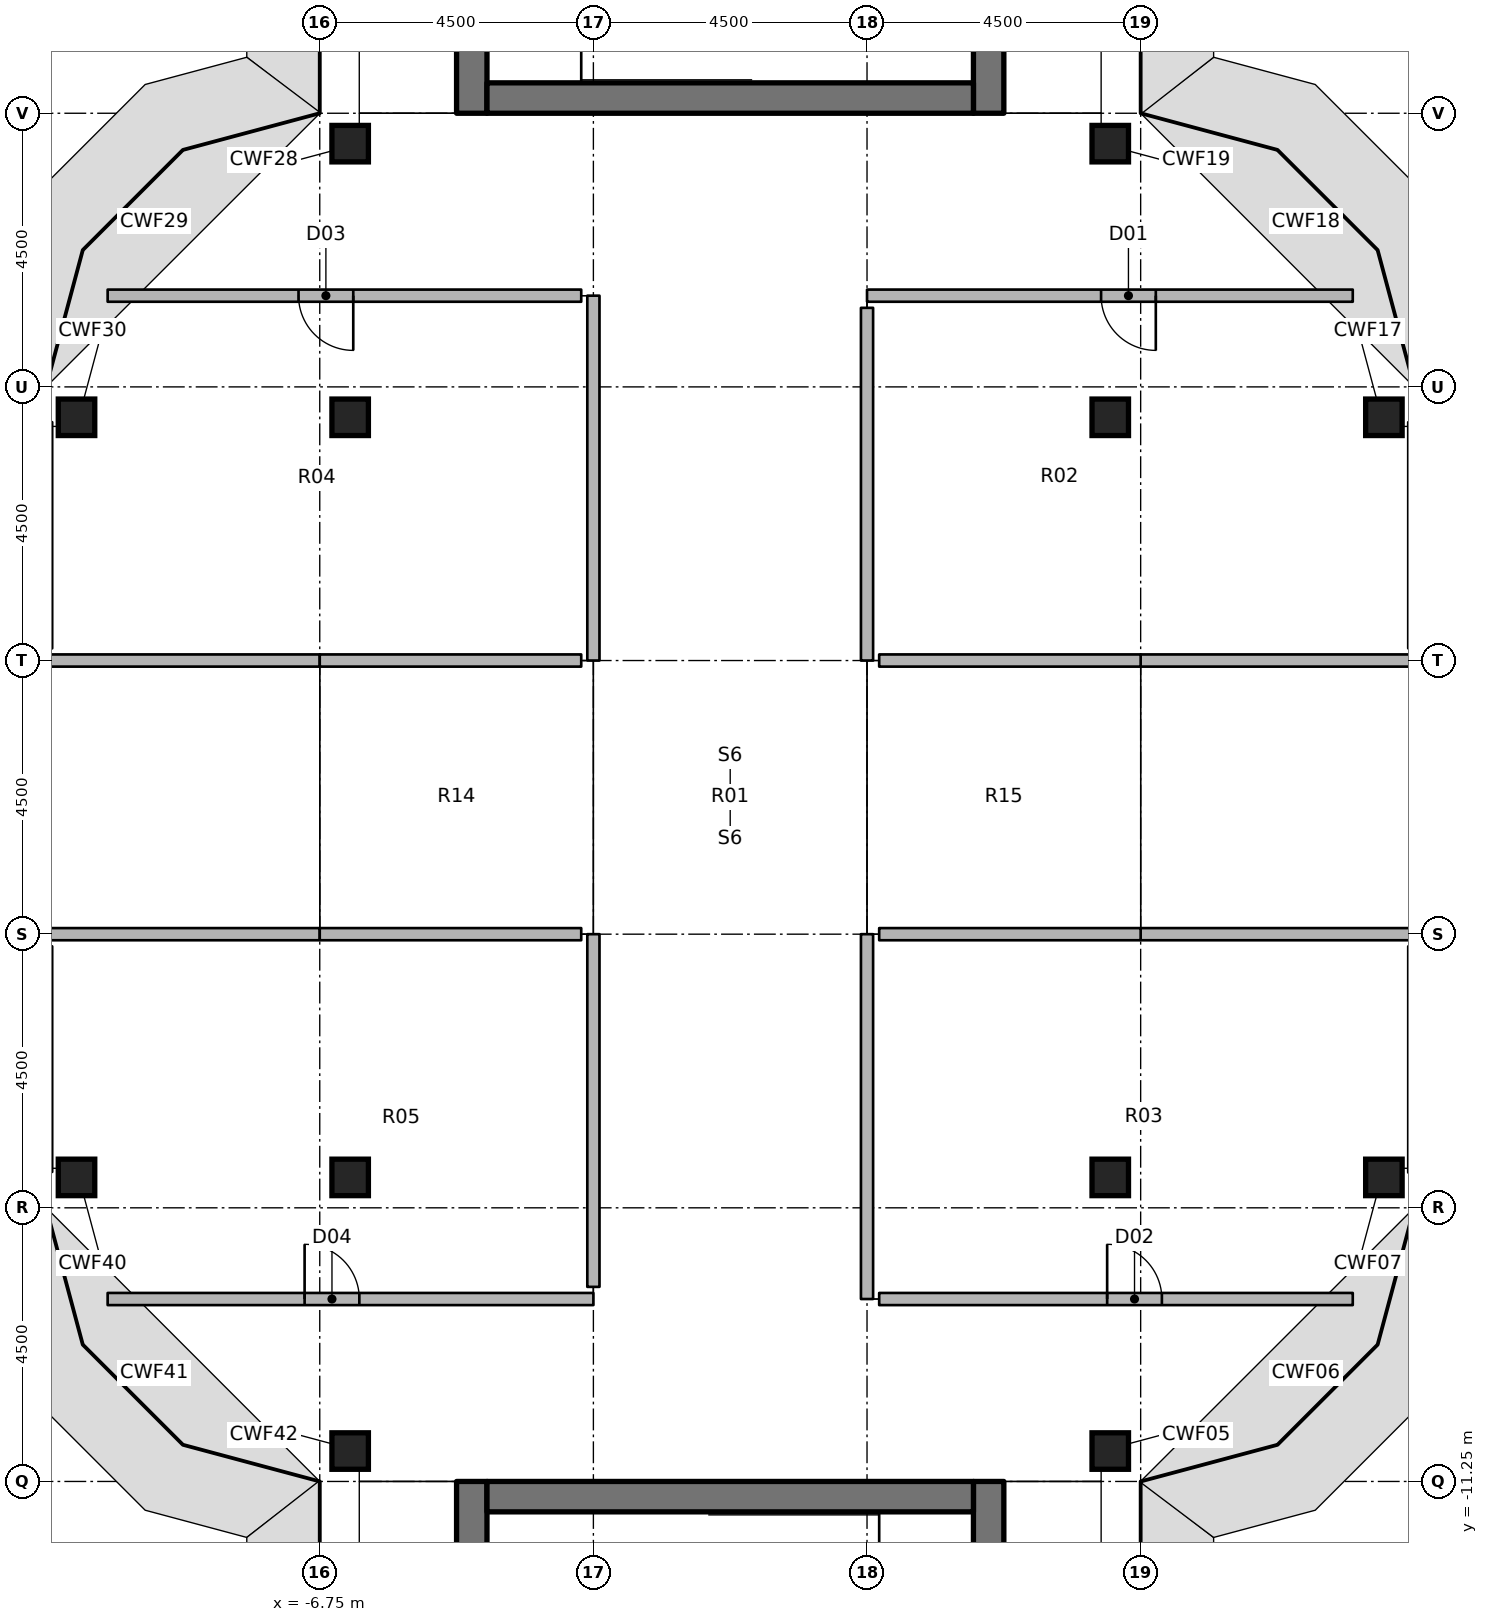
"""IFC4 building model, lengths in metres.
Left out: names, types, materials, properties, quantities, classifications, styles, units other than length and angle.
Written with IfcOpenShell. Run it as: python <this file> out.ifc"""

import sys

from ifc_helpers import new_model, si_unit, direction, frame, frame_2d, origin, origin_2d, place, context, subcontext, project, spatial, rectangle, extrude, element, fill, save


model = new_model("IFC4")
c1 = context("Model", 3, precision=1e-05, world=origin(), true_north=direction((0.0, 1.0)))
c2 = subcontext(c1, "Body", "Model", "MODEL_VIEW")
j1 = project(units=[si_unit("LENGTHUNIT", "METRE"), si_unit("PLANEANGLEUNIT", "RADIAN")], contexts=[c1])
p1 = place(None, origin())
s1 = spatial("IfcSite", under=j1, at=p1, CompositionType="ELEMENT")
p2 = place(p1, origin())
s2 = spatial("IfcBuilding", under=s1, at=p2, CompositionType="ELEMENT")
p3 = place(p2, frame((0.0, 0.0, 291.6)))
s3 = spatial("IfcBuildingStorey", under=s2, at=p3, CompositionType="ELEMENT", Elevation=291.6)
for number, where, z_axis, x_axis in (
    (1, (-10.75, -6.25, 0.0), (0.0, 0.0, 1.0), (1.0, 0.0, 0.0)),
    (2, (-10.75, 6.25, 0.0), (0.0, 0.0, 1.0), (1.0, 0.0, 0.0)),
    (3, (-6.25, -10.75, 0.0), (0.0, 0.0, 1.0), (1.0, 0.0, 0.0)),
    (4, (-6.25, -6.25, 0.0), (0.0, 0.0, 1.0), (1.0, 0.0, 0.0)),
    (5, (-6.25, 6.25, 0.0), (0.0, 0.0, 1.0), (1.0, 0.0, 0.0)),
    (6, (-6.25, 10.75, 0.0), (0.0, 0.0, 1.0), (1.0, 0.0, 0.0)),
    (7, (6.25, -10.75, 0.0), (0.0, 0.0, 1.0), (1.0, 0.0, 0.0)),
    (8, (6.25, -6.25, 0.0), (0.0, 0.0, 1.0), (1.0, 0.0, 0.0)),
    (9, (6.25, 6.25, 0.0), (0.0, 0.0, 1.0), (1.0, 0.0, 0.0)),
    (10, (6.25, 10.75, 0.0), (0.0, 0.0, 1.0), (1.0, 0.0, 0.0)),
    (11, (10.75, -6.25, 0.0), (0.0, 0.0, 1.0), (1.0, 0.0, 0.0)),
    (12, (10.75, 6.25, 0.0), (0.0, 0.0, 1.0), (1.0, 0.0, 0.0)),
):
    element("IfcColumn", number, at=place(p3, frame(where, z_axis=z_axis, x_axis=x_axis)), inside=s3, PredefinedType="COLUMN", context=c2, shape_type="SweptSolid", body=[
        extrude(rectangle(XDim=0.6, YDim=0.6, at=origin_2d()), origin(), (0.0, 0.0, 1.0), 3.45),
    ])
p4 = place(p3, frame((-4.25, 11.25, 0.0), z_axis=(0.0, 0.0, 1.0), x_axis=(0.0, 1.0, 0.0)))
e13 = element("IfcWall", 13, at=p4, inside=s3, PredefinedType="SHEAR", context=c2, shape_type="SweptSolid", body=[
    extrude(rectangle(XDim=15.0, YDim=0.5, at=frame_2d((7.5, 0.0))), origin(), (0.0, 0.0, 1.0), 3.6),
])
p5 = place(p4, frame((7.15, 0.0, 0.0)))
e14 = element("IfcOpeningElement", 14, at=p5, cuts=e13, PredefinedType="OPENING", context=c2, shape_type="SweptSolid", body=[
    extrude(rectangle(XDim=1.5, YDim=2.3, at=frame_2d((0.75, 1.15))), frame((0.0, 0.26, 0.0), z_axis=(0.0, -1.0, 0.0), x_axis=(1.0, 0.0, 0.0)), (0.0, 0.0, 1.0), 0.52),
])
p6 = place(p4, frame((13.9, 0.0, 0.0)))
e15 = element("IfcOpeningElement", 15, at=p6, cuts=e13, PredefinedType="OPENING", context=c2, shape_type="SweptSolid", body=[
    extrude(rectangle(XDim=0.9, YDim=2.1, at=frame_2d((0.45, 1.05))), frame((0.0, 0.26, 0.0), z_axis=(0.0, -1.0, 0.0), x_axis=(1.0, 0.0, 0.0)), (0.0, 0.0, 1.0), 0.52),
])
p7 = place(p4, frame((1.15, 0.0, 0.0)))
e16 = element("IfcOpeningElement", 16, at=p7, cuts=e13, PredefinedType="OPENING", context=c2, shape_type="SweptSolid", body=[
    extrude(rectangle(XDim=1.2, YDim=2.1, at=frame_2d((0.6, 1.05))), frame((0.0, 0.26, 0.0), z_axis=(0.0, -1.0, 0.0), x_axis=(1.0, 0.0, 0.0)), (0.0, 0.0, 1.0), 0.52),
])
p8 = place(p3, frame((4.25, 11.25, 0.0), z_axis=(0.0, 0.0, 1.0), x_axis=(0.0, 1.0, 0.0)))
e17 = element("IfcWall", 17, at=p8, inside=s3, PredefinedType="SHEAR", context=c2, shape_type="SweptSolid", body=[
    extrude(rectangle(XDim=15.0, YDim=0.5, at=frame_2d((7.5, 0.0))), origin(), (0.0, 0.0, 1.0), 3.6),
])
p9 = place(p8, frame((7.15, 0.0, 0.0)))
e18 = element("IfcOpeningElement", 18, at=p9, cuts=e17, PredefinedType="OPENING", context=c2, shape_type="SweptSolid", body=[
    extrude(rectangle(XDim=1.5, YDim=2.3, at=frame_2d((0.75, 1.15))), frame((0.0, 0.26, 0.0), z_axis=(0.0, -1.0, 0.0), x_axis=(1.0, 0.0, 0.0)), (0.0, 0.0, 1.0), 0.52),
])
p10 = place(p8, frame((5.55, 0.0, 0.0)))
e19 = element("IfcOpeningElement", 19, at=p10, cuts=e17, PredefinedType="OPENING", context=c2, shape_type="SweptSolid", body=[
    extrude(rectangle(XDim=1.2, YDim=2.1, at=frame_2d((0.6, 1.05))), frame((0.0, 0.26, 0.0), z_axis=(0.0, -1.0, 0.0), x_axis=(1.0, 0.0, 0.0)), (0.0, 0.0, 1.0), 0.52),
])
p11 = place(p3, frame((-4.0, 11.5, 0.0), z_axis=(0.0, 0.0, 1.0), x_axis=(1.0, 0.0, 0.0)))
e20 = element("IfcWall", 20, at=p11, inside=s3, PredefinedType="SHEAR", context=c2, shape_type="SweptSolid", body=[
    extrude(rectangle(XDim=8.0, YDim=0.5, at=frame_2d((4.0, 0.0))), origin(), (0.0, 0.0, 1.0), 3.6),
])
p12 = place(p3, frame((-4.25, -11.25, 0.0), z_axis=(0.0, 0.0, 1.0), x_axis=(0.0, -1.0, 0.0)))
e21 = element("IfcWall", 21, at=p12, inside=s3, PredefinedType="SHEAR", context=c2, shape_type="SweptSolid", body=[
    extrude(rectangle(XDim=15.0, YDim=0.5, at=frame_2d((7.5, 0.0))), origin(), (0.0, 0.0, 1.0), 3.6),
])
p13 = place(p12, frame((7.15, 0.0, 0.0)))
e22 = element("IfcOpeningElement", 22, at=p13, cuts=e21, PredefinedType="OPENING", context=c2, shape_type="SweptSolid", body=[
    extrude(rectangle(XDim=1.5, YDim=2.3, at=frame_2d((0.75, 1.15))), frame((0.0, 0.26, 0.0), z_axis=(0.0, -1.0, 0.0), x_axis=(1.0, 0.0, 0.0)), (0.0, 0.0, 1.0), 0.52),
])
p14 = place(p12, frame((5.55, 0.0, 0.0)))
e23 = element("IfcOpeningElement", 23, at=p14, cuts=e21, PredefinedType="OPENING", context=c2, shape_type="SweptSolid", body=[
    extrude(rectangle(XDim=1.2, YDim=2.1, at=frame_2d((0.6, 1.05))), frame((0.0, 0.26, 0.0), z_axis=(0.0, -1.0, 0.0), x_axis=(1.0, 0.0, 0.0)), (0.0, 0.0, 1.0), 0.52),
])
p15 = place(p3, frame((4.25, -11.25, 0.0), z_axis=(0.0, 0.0, 1.0), x_axis=(0.0, -1.0, 0.0)))
e24 = element("IfcWall", 24, at=p15, inside=s3, PredefinedType="SHEAR", context=c2, shape_type="SweptSolid", body=[
    extrude(rectangle(XDim=15.0, YDim=0.5, at=frame_2d((7.5, 0.0))), origin(), (0.0, 0.0, 1.0), 3.6),
])
p16 = place(p15, frame((7.15, 0.0, 0.0)))
e25 = element("IfcOpeningElement", 25, at=p16, cuts=e24, PredefinedType="OPENING", context=c2, shape_type="SweptSolid", body=[
    extrude(rectangle(XDim=1.5, YDim=2.3, at=frame_2d((0.75, 1.15))), frame((0.0, 0.26, 0.0), z_axis=(0.0, -1.0, 0.0), x_axis=(1.0, 0.0, 0.0)), (0.0, 0.0, 1.0), 0.52),
])
p17 = place(p15, frame((13.9, 0.0, 0.0)))
e26 = element("IfcOpeningElement", 26, at=p17, cuts=e24, PredefinedType="OPENING", context=c2, shape_type="SweptSolid", body=[
    extrude(rectangle(XDim=0.9, YDim=2.1, at=frame_2d((0.45, 1.05))), frame((0.0, 0.26, 0.0), z_axis=(0.0, -1.0, 0.0), x_axis=(1.0, 0.0, 0.0)), (0.0, 0.0, 1.0), 0.52),
])
p18 = place(p15, frame((1.15, 0.0, 0.0)))
e27 = element("IfcOpeningElement", 27, at=p18, cuts=e24, PredefinedType="OPENING", context=c2, shape_type="SweptSolid", body=[
    extrude(rectangle(XDim=1.2, YDim=2.1, at=frame_2d((0.6, 1.05))), frame((0.0, 0.26, 0.0), z_axis=(0.0, -1.0, 0.0), x_axis=(1.0, 0.0, 0.0)), (0.0, 0.0, 1.0), 0.52),
])
p19 = place(p3, frame((-4.0, -11.5, 0.0), z_axis=(0.0, 0.0, 1.0), x_axis=(1.0, 0.0, 0.0)))
e28 = element("IfcWall", 28, at=p19, inside=s3, PredefinedType="SHEAR", context=c2, shape_type="SweptSolid", body=[
    extrude(rectangle(XDim=8.0, YDim=0.5, at=frame_2d((4.0, 0.0))), origin(), (0.0, 0.0, 1.0), 3.6),
])
p20 = place(p3, frame((10.238, 8.25, 0.0), z_axis=(0.0, 0.0, 1.0), x_axis=(-1.0, 0.0, 0.0)))
e29 = element("IfcWall", 29, at=p20, inside=s3, PredefinedType="PARTITIONING", context=c2, shape_type="SweptSolid", body=[
    extrude(rectangle(XDim=7.988, YDim=0.2, at=frame_2d((3.994, 0.0))), origin(), (0.0, 0.0, 1.0), 3.45),
])
p21 = place(p20, frame((3.239, 0.0, 0.0)))
e30 = element("IfcOpeningElement", 30, at=p21, cuts=e29, PredefinedType="OPENING", context=c2, shape_type="SweptSolid", body=[
    extrude(rectangle(XDim=0.9, YDim=2.1, at=frame_2d((0.45, 1.05))), frame((0.0, 0.11, 0.0), z_axis=(0.0, -1.0, 0.0), x_axis=(1.0, 0.0, 0.0)), (0.0, 0.0, 1.0), 0.22),
])
p22 = place(p3, frame((2.25, 8.05, 0.0), z_axis=(0.0, 0.0, 1.0), x_axis=(0.0, -1.0, 0.0)))
e31 = element("IfcWall", 31, at=p22, inside=s3, PredefinedType="PARTITIONING", context=c2, shape_type="SweptSolid", body=[
    extrude(rectangle(XDim=5.8, YDim=0.2, at=frame_2d((2.9, 0.0))), origin(), (0.0, 0.0, 1.0), 2.681),
])
p23 = place(p3, frame((2.25, -2.25, 0.0), z_axis=(0.0, 0.0, 1.0), x_axis=(0.0, -1.0, 0.0)))
e32 = element("IfcWall", 32, at=p23, inside=s3, PredefinedType="PARTITIONING", context=c2, shape_type="SweptSolid", body=[
    extrude(rectangle(XDim=6.0, YDim=0.2, at=frame_2d((3.0, 0.0))), origin(), (0.0, 0.0, 1.0), 2.681),
])
p24 = place(p3, frame((2.45, -8.25, 0.0), z_axis=(0.0, 0.0, 1.0), x_axis=(1.0, 0.0, 0.0)))
e33 = element("IfcWall", 33, at=p24, inside=s3, PredefinedType="PARTITIONING", context=c2, shape_type="SweptSolid", body=[
    extrude(rectangle(XDim=7.788, YDim=0.2, at=frame_2d((3.894, 0.0))), origin(), (0.0, 0.0, 1.0), 3.45),
])
p25 = place(p24, frame((3.749, 0.0, 0.0)))
e34 = element("IfcOpeningElement", 34, at=p25, cuts=e33, PredefinedType="OPENING", context=c2, shape_type="SweptSolid", body=[
    extrude(rectangle(XDim=0.9, YDim=2.1, at=frame_2d((0.45, 1.05))), frame((0.0, 0.11, 0.0), z_axis=(0.0, -1.0, 0.0), x_axis=(1.0, 0.0, 0.0)), (0.0, 0.0, 1.0), 0.22),
])
p26 = place(p3, frame((-2.25, 2.25, 0.0), z_axis=(0.0, 0.0, 1.0), x_axis=(0.0, 1.0, 0.0)))
e35 = element("IfcWall", 35, at=p26, inside=s3, PredefinedType="PARTITIONING", context=c2, shape_type="SweptSolid", body=[
    extrude(rectangle(XDim=6.0, YDim=0.2, at=frame_2d((3.0, 0.0))), origin(), (0.0, 0.0, 1.0), 2.681),
])
p27 = place(p3, frame((-2.45, 8.25, 0.0), z_axis=(0.0, 0.0, 1.0), x_axis=(-1.0, 0.0, 0.0)))
e36 = element("IfcWall", 36, at=p27, inside=s3, PredefinedType="PARTITIONING", context=c2, shape_type="SweptSolid", body=[
    extrude(rectangle(XDim=7.788, YDim=0.2, at=frame_2d((3.894, 0.0))), origin(), (0.0, 0.0, 1.0), 3.45),
])
p28 = place(p27, frame((3.749, 0.0, 0.0)))
e37 = element("IfcOpeningElement", 37, at=p28, cuts=e36, PredefinedType="OPENING", context=c2, shape_type="SweptSolid", body=[
    extrude(rectangle(XDim=0.9, YDim=2.1, at=frame_2d((0.45, 1.05))), frame((0.0, 0.11, 0.0), z_axis=(0.0, -1.0, 0.0), x_axis=(1.0, 0.0, 0.0)), (0.0, 0.0, 1.0), 0.22),
])
p29 = place(p3, frame((-10.238, -8.25, 0.0), z_axis=(0.0, 0.0, 1.0), x_axis=(1.0, 0.0, 0.0)))
e38 = element("IfcWall", 38, at=p29, inside=s3, PredefinedType="PARTITIONING", context=c2, shape_type="SweptSolid", body=[
    extrude(rectangle(XDim=7.988, YDim=0.2, at=frame_2d((3.994, 0.0))), origin(), (0.0, 0.0, 1.0), 3.45),
])
p30 = place(p29, frame((3.239, 0.0, 0.0)))
e39 = element("IfcOpeningElement", 39, at=p30, cuts=e38, PredefinedType="OPENING", context=c2, shape_type="SweptSolid", body=[
    extrude(rectangle(XDim=0.9, YDim=2.1, at=frame_2d((0.45, 1.05))), frame((0.0, 0.11, 0.0), z_axis=(0.0, -1.0, 0.0), x_axis=(1.0, 0.0, 0.0)), (0.0, 0.0, 1.0), 0.22),
])
p31 = place(p3, frame((-2.25, -8.05, 0.0), z_axis=(0.0, 0.0, 1.0), x_axis=(0.0, 1.0, 0.0)))
e40 = element("IfcWall", 40, at=p31, inside=s3, PredefinedType="PARTITIONING", context=c2, shape_type="SweptSolid", body=[
    extrude(rectangle(XDim=5.8, YDim=0.2, at=frame_2d((2.9, 0.0))), origin(), (0.0, 0.0, 1.0), 2.681),
])
p32 = place(p3, frame((11.25, 2.25, 0.0), z_axis=(0.0, 0.0, 1.0), x_axis=(-1.0, 0.0, 0.0)))
e41 = element("IfcWall", 41, at=p32, inside=s3, PredefinedType="PARTITIONING", context=c2, shape_type="SweptSolid", body=[
    extrude(rectangle(XDim=4.5, YDim=0.2, at=frame_2d((2.25, 0.0))), origin(), (0.0, 0.0, 1.0), 2.828),
])
p33 = place(p3, frame((6.75, 2.25, 0.0), z_axis=(0.0, 0.0, 1.0), x_axis=(-1.0, 0.0, 0.0)))
e42 = element("IfcWall", 42, at=p33, inside=s3, PredefinedType="PARTITIONING", context=c2, shape_type="SweptSolid", body=[
    extrude(rectangle(XDim=4.3, YDim=0.2, at=frame_2d((2.15, 0.0))), origin(), (0.0, 0.0, 1.0), 2.828),
])
p34 = place(p3, frame((6.75, -2.25, 0.0), z_axis=(0.0, 0.0, 1.0), x_axis=(1.0, 0.0, 0.0)))
e43 = element("IfcWall", 43, at=p34, inside=s3, PredefinedType="PARTITIONING", context=c2, shape_type="SweptSolid", body=[
    extrude(rectangle(XDim=4.5, YDim=0.2, at=frame_2d((2.25, 0.0))), origin(), (0.0, 0.0, 1.0), 2.828),
])
p35 = place(p3, frame((2.45, -2.25, 0.0), z_axis=(0.0, 0.0, 1.0), x_axis=(1.0, 0.0, 0.0)))
e44 = element("IfcWall", 44, at=p35, inside=s3, PredefinedType="PARTITIONING", context=c2, shape_type="SweptSolid", body=[
    extrude(rectangle(XDim=4.3, YDim=0.2, at=frame_2d((2.15, 0.0))), origin(), (0.0, 0.0, 1.0), 2.828),
])
p36 = place(p3, frame((-6.75, 2.25, 0.0), z_axis=(0.0, 0.0, 1.0), x_axis=(-1.0, 0.0, 0.0)))
e45 = element("IfcWall", 45, at=p36, inside=s3, PredefinedType="PARTITIONING", context=c2, shape_type="SweptSolid", body=[
    extrude(rectangle(XDim=4.5, YDim=0.2, at=frame_2d((2.25, 0.0))), origin(), (0.0, 0.0, 1.0), 2.828),
])
p37 = place(p3, frame((-2.45, 2.25, 0.0), z_axis=(0.0, 0.0, 1.0), x_axis=(-1.0, 0.0, 0.0)))
e46 = element("IfcWall", 46, at=p37, inside=s3, PredefinedType="PARTITIONING", context=c2, shape_type="SweptSolid", body=[
    extrude(rectangle(XDim=4.3, YDim=0.2, at=frame_2d((2.15, 0.0))), origin(), (0.0, 0.0, 1.0), 2.828),
])
p38 = place(p3, frame((-11.25, -2.25, 0.0), z_axis=(0.0, 0.0, 1.0), x_axis=(1.0, 0.0, 0.0)))
e47 = element("IfcWall", 47, at=p38, inside=s3, PredefinedType="PARTITIONING", context=c2, shape_type="SweptSolid", body=[
    extrude(rectangle(XDim=4.5, YDim=0.2, at=frame_2d((2.25, 0.0))), origin(), (0.0, 0.0, 1.0), 2.828),
])
p39 = place(p3, frame((-6.75, -2.25, 0.0), z_axis=(0.0, 0.0, 1.0), x_axis=(1.0, 0.0, 0.0)))
e48 = element("IfcWall", 48, at=p39, inside=s3, PredefinedType="PARTITIONING", context=c2, shape_type="SweptSolid", body=[
    extrude(rectangle(XDim=4.3, YDim=0.2, at=frame_2d((2.15, 0.0))), origin(), (0.0, 0.0, 1.0), 2.828),
])
p40 = place(p21, origin())
e49 = element("IfcDoor", 49, at=p40, inside=s3, OperationType="SINGLE_SWING_LEFT", PredefinedType="DOOR", context=c2, shape_type="SweptSolid", body=[
    extrude(rectangle(XDim=0.9, YDim=2.1, at=frame_2d((0.45, 1.05))), frame((0.0, 0.025, 0.0), z_axis=(0.0, -1.0, 0.0), x_axis=(1.0, 0.0, 0.0)), (0.0, 0.0, 1.0), 0.05),
])
fill(e30, e49)
p41 = place(p25, origin())
e50 = element("IfcDoor", 50, at=p41, inside=s3, OperationType="SINGLE_SWING_LEFT", PredefinedType="DOOR", context=c2, shape_type="SweptSolid", body=[
    extrude(rectangle(XDim=0.9, YDim=2.1, at=frame_2d((0.45, 1.05))), frame((0.0, 0.025, 0.0), z_axis=(0.0, -1.0, 0.0), x_axis=(1.0, 0.0, 0.0)), (0.0, 0.0, 1.0), 0.05),
])
fill(e34, e50)
p42 = place(p28, origin())
e51 = element("IfcDoor", 51, at=p42, inside=s3, OperationType="SINGLE_SWING_LEFT", PredefinedType="DOOR", context=c2, shape_type="SweptSolid", body=[
    extrude(rectangle(XDim=0.9, YDim=2.1, at=frame_2d((0.45, 1.05))), frame((0.0, 0.025, 0.0), z_axis=(0.0, -1.0, 0.0), x_axis=(1.0, 0.0, 0.0)), (0.0, 0.0, 1.0), 0.05),
])
fill(e37, e51)
p43 = place(p30, origin())
e52 = element("IfcDoor", 52, at=p43, inside=s3, OperationType="SINGLE_SWING_LEFT", PredefinedType="DOOR", context=c2, shape_type="SweptSolid", body=[
    extrude(rectangle(XDim=0.9, YDim=2.1, at=frame_2d((0.45, 1.05))), frame((0.0, 0.025, 0.0), z_axis=(0.0, -1.0, 0.0), x_axis=(1.0, 0.0, 0.0)), (0.0, 0.0, 1.0), 0.05),
])
fill(e39, e52)
save(model, sys.argv[1])
